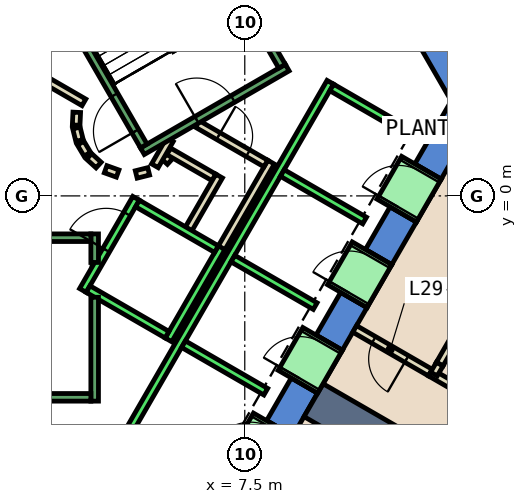
"""IFC4 building model, lengths in metres.
Left out: names, types, materials, properties, quantities, classifications, styles, units other than length and angle.
Written with IfcOpenShell. Run it as: python <this file> out.ifc"""

import sys

from ifc_helpers import new_model, si_unit, direction, frame, frame_2d, origin, place, context, subcontext, project, spatial, polyline, rectangle, outline, extrude, element, fill, save


model = new_model("IFC4")
c1 = context("Model", 3, precision=1e-05, world=origin(), true_north=direction((0.0, 1.0)))
c2 = subcontext(c1, "Body", "Model", "MODEL_VIEW")
j1 = project(units=[si_unit("LENGTHUNIT", "METRE"), si_unit("PLANEANGLEUNIT", "RADIAN")], contexts=[c1])
p1 = place(None, origin())
s1 = spatial("IfcSite", under=j1, at=p1, CompositionType="ELEMENT")
p2 = place(p1, origin())
s2 = spatial("IfcBuilding", under=s1, at=p2, CompositionType="ELEMENT")
p3 = place(p2, frame((0.0, 0.0, 132.8)))
s3 = spatial("IfcBuildingStorey", under=s2, at=p3, CompositionType="ELEMENT", Elevation=132.8)
p4 = place(p3, frame((0.0, 0.0, -0.6)))
e1 = element("IfcWall", 1, at=p4, inside=s3, PredefinedType="SHEAR", context=c2, shape_type="SweptSolid", body=[
    extrude(outline(polyline([(8.517, 11.747), (7.824, 11.347), (12.933, 2.5), (13.856, 2.5), (8.517, 11.747)])), origin(), (0.0, 0.0, 1.0), 5.4),
])
p5 = place(p3, frame((0.0, 0.0, -0.6)))
e2 = element("IfcWall", 2, at=p5, inside=s3, PredefinedType="SHEAR", context=c2, shape_type="SweptSolid", body=[
    extrude(outline(polyline([(9.417, -5.189), (8.724, -4.789), (8.075, -5.914), (8.767, -6.314), (9.417, -5.189)])), origin(), (0.0, 0.0, 1.0), 5.4),
])
p6 = place(p3, frame((0.0, 0.0, -0.6)))
e3 = element("IfcWall", 3, at=p6, inside=s3, PredefinedType="SHEAR", context=c2, shape_type="SweptSolid", body=[
    extrude(outline(polyline([(10.717, -2.937), (10.025, -2.537), (9.374, -3.663), (10.067, -4.063), (10.717, -2.937)])), origin(), (0.0, 0.0, 1.0), 5.4),
])
p7 = place(p3, frame((0.0, 0.0, -0.6)))
e4 = element("IfcWall", 4, at=p7, inside=s3, PredefinedType="SHEAR", context=c2, shape_type="SweptSolid", body=[
    extrude(outline(polyline([(12.017, -0.686), (11.324, -0.286), (10.675, -1.411), (11.367, -1.811), (12.017, -0.686)])), origin(), (0.0, 0.0, 1.0), 5.4),
])
p8 = place(p3, frame((0.0, 0.0, -0.6)))
e5 = element("IfcWall", 5, at=p8, inside=s3, PredefinedType="SHEAR", context=c2, shape_type="SweptSolid", body=[
    extrude(outline(polyline([(11.974, 0.84), (12.667, 0.44), (13.856, 2.5), (12.933, 2.5), (11.974, 0.84)])), origin(), (0.0, 0.0, 1.0), 5.4),
])
p9 = place(p3, frame((0.0, 0.0, 3.6)))
e6 = element("IfcWall", 6, at=p9, inside=s3, PredefinedType="SHEAR", context=c2, shape_type="SweptSolid", body=[
    extrude(outline(polyline([(8.767, -6.314), (8.075, -5.914), (7.424, -7.04), (8.117, -7.44), (8.767, -6.314)])), origin(), (0.0, 0.0, 1.0), 1.2),
])
p10 = place(p3, frame((0.0, 0.0, 3.6)))
e7 = element("IfcWall", 7, at=p10, inside=s3, PredefinedType="SHEAR", context=c2, shape_type="SweptSolid", body=[
    extrude(outline(polyline([(10.067, -4.063), (9.374, -3.663), (8.724, -4.789), (9.417, -5.189), (10.067, -4.063)])), origin(), (0.0, 0.0, 1.0), 1.2),
])
p11 = place(p3, frame((0.0, 0.0, 3.6)))
e8 = element("IfcWall", 8, at=p11, inside=s3, PredefinedType="SHEAR", context=c2, shape_type="SweptSolid", body=[
    extrude(outline(polyline([(11.367, -1.811), (10.675, -1.411), (10.025, -2.537), (10.717, -2.937), (11.367, -1.811)])), origin(), (0.0, 0.0, 1.0), 1.2),
])
p12 = place(p3, frame((0.0, 0.0, 3.6)))
e9 = element("IfcWall", 9, at=p12, inside=s3, PredefinedType="SHEAR", context=c2, shape_type="SweptSolid", body=[
    extrude(outline(polyline([(12.667, 0.44), (11.974, 0.84), (11.324, -0.286), (12.017, -0.686), (12.667, 0.44)])), origin(), (0.0, 0.0, 1.0), 1.2),
])
p13 = place(p3, frame((9.31, -5.375, 0.0), z_axis=(0.0, 0.0, 1.0), x_axis=(0.86602173752, -0.500006350103, 0.0)))
e10 = element("IfcWall", 10, at=p13, inside=s3, PredefinedType="SHEAR", context=c2, shape_type="SweptSolid", body=[
    extrude(rectangle(XDim=31.463, YDim=1.0, at=frame_2d((15.732, 0.0))), origin(), (0.0, 0.0, 1.0), 4.8),
])
p14 = place(p3, frame((5.39, 0.898, 0.0), z_axis=(0.0, 0.0, 1.0), x_axis=(0.673828488714, 0.738887791073, 0.0)))
e11 = element("IfcWall", 11, at=p14, inside=s3, PredefinedType="PARTITIONING", context=c2, shape_type="SweptSolid", body=[
    extrude(rectangle(XDim=0.263, YDim=0.2, at=frame_2d((0.131, 0.0))), origin(), (0.0, 0.0, 1.0), 4.8),
])
p15 = place(p3, frame((5.499, 1.172, 0.0), z_axis=(0.0, 0.0, 1.0), x_axis=(0.866333505267, -0.499465972466, 0.0)))
e12 = element("IfcWall", 12, at=p15, inside=s3, PredefinedType="PARTITIONING", context=c2, shape_type="SweptSolid", body=[
    extrude(rectangle(XDim=1.374, YDim=0.2, at=frame_2d((0.687, 0.0))), origin(), (0.0, 0.0, 1.0), 4.8),
])
p16 = place(p3, frame((6.826, 0.522, 0.0), z_axis=(0.0, 0.0, 1.0), x_axis=(-0.500016722714, -0.866015748706, 0.0)))
e13 = element("IfcWall", 13, at=p16, inside=s3, PredefinedType="PARTITIONING", context=c2, shape_type="SweptSolid", body=[
    extrude(rectangle(XDim=1.7, YDim=0.2, at=frame_2d((0.85, 0.0))), origin(), (0.0, 0.0, 1.0), 4.8),
])
p17 = place(p3, frame((8.192, 0.888, 0.0), z_axis=(0.0, 0.0, 1.0), x_axis=(-0.499940625693, -0.866059680843, 0.0)))
e14 = element("IfcWall", 14, at=p17, inside=s3, PredefinedType="PARTITIONING", context=c2, shape_type="SweptSolid", body=[
    extrude(rectangle(XDim=2.68, YDim=0.2, at=frame_2d((1.34, 0.0))), origin(), (0.0, 0.0, 1.0), 4.8),
])
p18 = place(p3, frame((5.135, 0.793, 0.0), z_axis=(0.0, 0.0, 1.0), x_axis=(0.499526442893, 0.866298639529, 0.0)))
e15 = element("IfcWall", 15, at=p18, inside=s3, PredefinedType="PARTITIONING", context=c2, shape_type="SweptSolid", body=[
    extrude(rectangle(XDim=0.791, YDim=0.2, at=frame_2d((0.396, 0.0))), origin(), (0.0, 0.0, 1.0), 4.8),
])
p19 = place(p3, frame((6.25, 1.894, 0.0), z_axis=(0.0, 0.0, 1.0), x_axis=(0.866043184279, -0.499969202016, 0.0)))
e16 = element("IfcWall", 16, at=p19, inside=s3, PredefinedType="PARTITIONING", context=c2, shape_type="SweptSolid", body=[
    extrude(rectangle(XDim=2.084, YDim=0.2, at=frame_2d((1.042, 0.0))), origin(), (0.0, 0.0, 1.0), 4.8),
])
p20 = place(p19, frame((0.642, 0.0, 0.0)))
e17 = element("IfcOpeningElement", 17, at=p20, cuts=e16, PredefinedType="OPENING", context=c2, shape_type="SweptSolid", body=[
    extrude(rectangle(XDim=0.9, YDim=2.1, at=frame_2d((0.45, 1.05))), frame((0.0, 0.11, 0.0), z_axis=(0.0, -1.0, 0.0), x_axis=(1.0, 0.0, 0.0)), (0.0, 0.0, 1.0), 0.22),
])
p21 = place(p3, frame((3.079, 2.199, 0.0), z_axis=(0.0, 0.0, 1.0), x_axis=(-0.047771483479, -0.998858290933, 0.0)))
e18 = element("IfcWall", 18, at=p21, inside=s3, PredefinedType="PARTITIONING", context=c2, shape_type="SweptSolid", body=[
    extrude(rectangle(XDim=0.337, YDim=0.2, at=frame_2d((0.169, 0.0))), origin(), (0.0, 0.0, 1.0), 4.8),
])
p22 = place(p3, frame((3.07, 1.786, 0.0), z_axis=(0.0, 0.0, 1.0), x_axis=(0.242705583207, -0.970099994784, 0.0)))
e19 = element("IfcWall", 19, at=p22, inside=s3, PredefinedType="PARTITIONING", context=c2, shape_type="SweptSolid", body=[
    extrude(rectangle(XDim=0.338, YDim=0.2, at=frame_2d((0.169, 0.0))), origin(), (0.0, 0.0, 1.0), 4.8),
])
for number, where, z_axis, x_axis in (
    (20, (3.182, 1.388, 0.0), (0.0, 0.0, 1.0), (0.512, -0.859, 0.0)),
    (21, (3.404, 1.039, 0.0), (0.0, 0.0, 1.0), (0.74, -0.672, 0.0)),
):
    element("IfcWall", number, at=place(p3, frame(where, z_axis=z_axis, x_axis=x_axis)), inside=s3, PredefinedType="PARTITIONING", context=c2, shape_type="SweptSolid", body=[
        extrude(rectangle(XDim=0.338, YDim=0.2, at=frame_2d((0.169, 0.0))), origin(), (0.0, 0.0, 1.0), 4.8),
    ])
p23 = place(p3, frame((3.838, 0.702, 0.0), z_axis=(0.0, 0.0, 1.0), x_axis=(0.941035081519, -0.338308993895, 0.0)))
e22 = element("IfcWall", 22, at=p23, inside=s3, PredefinedType="PARTITIONING", context=c2, shape_type="SweptSolid", body=[
    extrude(rectangle(XDim=0.337, YDim=0.2, at=frame_2d((0.168, 0.0))), origin(), (0.0, 0.0, 1.0), 4.8),
])
p24 = place(p3, frame((4.644, 0.564, 0.0), z_axis=(0.0, 0.0, 1.0), x_axis=(0.969929076366, 0.243387729394, 0.0)))
e23 = element("IfcWall", 23, at=p24, inside=s3, PredefinedType="PARTITIONING", context=c2, shape_type="SweptSolid", body=[
    extrude(rectangle(XDim=0.337, YDim=0.2, at=frame_2d((0.168, 0.0))), origin(), (0.0, 0.0, 1.0), 4.8),
])
p25 = place(p3, frame((2.012, 3.186, 0.0), z_axis=(0.0, 0.0, 1.0), x_axis=(0.865891012941, -0.500232699559, 0.0)))
e24 = element("IfcWall", 24, at=p25, inside=s3, PredefinedType="PARTITIONING", context=c2, shape_type="SweptSolid", body=[
    extrude(rectangle(XDim=1.449, YDim=0.2, at=frame_2d((0.725, 0.0))), origin(), (0.0, 0.0, 1.0), 4.8),
])
p26 = place(p3, frame((12.384, -4.65, 0.0), z_axis=(0.0, 0.0, 1.0), x_axis=(-0.866053019151, 0.499952165731, 0.0)))
e25 = element("IfcWall", 25, at=p26, inside=s3, PredefinedType="PARTITIONING", context=c2, shape_type="SweptSolid", body=[
    extrude(rectangle(XDim=2.3, YDim=0.2, at=frame_2d((1.15, 0.0))), origin(), (0.0, 0.0, 1.0), 4.8),
])
p27 = place(p26, frame((0.721, 0.0, 0.0)))
e26 = element("IfcOpeningElement", 26, at=p27, cuts=e25, PredefinedType="OPENING", context=c2, shape_type="SweptSolid", body=[
    extrude(rectangle(XDim=1.0, YDim=2.1, at=frame_2d((0.5, 1.05))), frame((0.0, 0.11, 0.0), z_axis=(0.0, -1.0, 0.0), x_axis=(1.0, 0.0, 0.0)), (0.0, 0.0, 1.0), 0.22),
])
p28 = place(p3, frame((12.384, -4.65, 0.0), z_axis=(0.0, 0.0, 1.0), x_axis=(0.866033509011, -0.499985961072, 0.0)))
e27 = element("IfcWall", 27, at=p28, inside=s3, PredefinedType="PARTITIONING", context=c2, shape_type="SweptSolid", body=[
    extrude(rectangle(XDim=29.487, YDim=0.2, at=frame_2d((14.744, 0.0))), origin(), (0.0, 0.0, 1.0), 4.8),
])
p29 = place(p3, frame((11.938, 10.622, 0.0), z_axis=(0.0, 0.0, 1.0), x_axis=(0.499964736285, -0.866045762343, 0.0)))
e28 = element("IfcWall", 28, at=p29, inside=s3, PredefinedType="PARTITIONING", context=c2, shape_type="SweptSolid", body=[
    extrude(rectangle(XDim=9.479, YDim=0.2, at=frame_2d((4.739, 0.0))), origin(), (0.0, 0.0, 1.0), 4.8),
])
p30 = place(p29, frame((8.161, 0.0, 0.0)))
e29 = element("IfcOpeningElement", 29, at=p30, cuts=e28, PredefinedType="OPENING", context=c2, shape_type="SweptSolid", body=[
    extrude(rectangle(XDim=1.0, YDim=2.1, at=frame_2d((0.5, 1.05))), frame((0.0, 0.11, 0.0), z_axis=(0.0, -1.0, 0.0), x_axis=(1.0, 0.0, 0.0)), (0.0, 0.0, 1.0), 0.22),
])
p31 = place(p3, frame((13.085, -3.637, 0.0), z_axis=(0.0, 0.0, 1.0), x_axis=(-0.500402557727, -0.865792862191, 0.0)))
e30 = element("IfcWall", 30, at=p31, inside=s3, PredefinedType="PARTITIONING", context=c2, shape_type="SweptSolid", body=[
    extrude(rectangle(XDim=0.911, YDim=0.2, at=frame_2d((0.456, 0.0))), origin(), (0.0, 0.0, 1.0), 2.1),
])
p32 = place(p3, frame((12.629, -4.426, 0.0), z_axis=(0.0, 0.0, 1.0), x_axis=(-0.500493465029, -0.865740314103, 0.0)))
e31 = element("IfcWall", 31, at=p32, inside=s3, PredefinedType="PARTITIONING", context=c2, shape_type="SweptSolid", body=[
    extrude(rectangle(XDim=0.302, YDim=0.2, at=frame_2d((0.151, 0.0))), origin(), (0.0, 0.0, 1.0), 4.8),
])
p33 = place(p3, frame((3.24, -2.488, 0.0), z_axis=(0.0, 0.0, 1.0), x_axis=(0.49994636267, 0.866056369097, 0.0)))
e32 = element("IfcWall", 32, at=p33, inside=s3, PredefinedType="STANDARD", context=c2, shape_type="SweptSolid", body=[
    extrude(rectangle(XDim=2.8, YDim=0.2, at=frame_2d((1.4, 0.0))), origin(), (0.0, 0.0, 1.0), 4.8),
])
p34 = place(p33, frame((1.225, 0.0, 0.0)))
e33 = element("IfcOpeningElement", 33, at=p34, cuts=e32, PredefinedType="OPENING", context=c2, shape_type="SweptSolid", body=[
    extrude(rectangle(XDim=1.1, YDim=2.1, at=frame_2d((0.55, 1.05))), frame((0.0, 0.11, 0.0), z_axis=(0.0, -1.0, 0.0), x_axis=(1.0, 0.0, 0.0)), (0.0, 0.0, 1.0), 0.22),
])
p35 = place(p3, frame((5.492, -3.788, 0.0), z_axis=(0.0, 0.0, 1.0), x_axis=(0.500011755427, 0.866018616679, 0.0)))
e34 = element("IfcWall", 34, at=p35, inside=s3, PredefinedType="STANDARD", context=c2, shape_type="SweptSolid", body=[
    extrude(rectangle(XDim=2.8, YDim=0.2, at=frame_2d((1.4, 0.0))), origin(), (0.0, 0.0, 1.0), 4.8),
])
p36 = place(p3, frame((3.377, -2.452, 0.0), z_axis=(0.0, 0.0, 1.0), x_axis=(0.865955154139, -0.50012165622, 0.0)))
e35 = element("IfcWall", 35, at=p36, inside=s3, PredefinedType="STANDARD", context=c2, shape_type="SweptSolid", body=[
    extrude(rectangle(XDim=2.4, YDim=0.2, at=frame_2d((1.2, 0.0))), origin(), (0.0, 0.0, 1.0), 4.8),
])
p37 = place(p3, frame((4.677, -0.2, 0.0), z_axis=(0.0, 0.0, 1.0), x_axis=(0.865973769406, -0.500089422704, 0.0)))
e36 = element("IfcWall", 36, at=p37, inside=s3, PredefinedType="STANDARD", context=c2, shape_type="SweptSolid", body=[
    extrude(rectangle(XDim=2.399, YDim=0.2, at=frame_2d((1.2, 0.0))), origin(), (0.0, 0.0, 1.0), 4.8),
])
p38 = place(p3, frame((4.451, -6.19, 0.0), z_axis=(0.0, 0.0, 1.0), x_axis=(0.50000090737, 0.866024879913, 0.0)))
e37 = element("IfcWall", 37, at=p38, inside=s3, PredefinedType="STANDARD", context=c2, shape_type="SweptSolid", body=[
    extrude(rectangle(XDim=10.6, YDim=0.2, at=frame_2d((5.3, 0.0))), origin(), (0.0, 0.0, 1.0), 4.8),
])
for number, where, z_axis, x_axis in (
    (38, (5.888, -3.902, 0.0), (0.0, 0.0, 1.0), (0.866, -0.5, 0.0)),
    (39, (7.188, -1.65, 0.0), (0.0, 0.0, 1.0), (0.866, -0.5, 0.0)),
    (40, (8.488, 0.602, 0.0), (0.0, 0.0, 1.0), (0.866, -0.5, 0.0)),
):
    element("IfcWall", number, at=place(p3, frame(where, z_axis=z_axis, x_axis=x_axis)), inside=s3, PredefinedType="STANDARD", context=c2, shape_type="SweptSolid", body=[
        extrude(rectangle(XDim=2.5, YDim=0.2, at=frame_2d((1.25, 0.0))), origin(), (0.0, 0.0, 1.0), 4.8),
    ])
p39 = place(p3, frame((9.788, 2.853, 0.0), z_axis=(0.0, 0.0, 1.0), x_axis=(0.865998541277, -0.500046524342, 0.0)))
e41 = element("IfcWall", 41, at=p39, inside=s3, PredefinedType="STANDARD", context=c2, shape_type="SweptSolid", body=[
    extrude(rectangle(XDim=2.5, YDim=0.2, at=frame_2d((1.25, 0.0))), origin(), (0.0, 0.0, 1.0), 4.8),
])
p40 = place(p3, frame((7.598, -7.14, 0.0), z_axis=(0.0, 0.0, 1.0), x_axis=(0.500362116554, 0.865816234728, 0.0)))
e42 = element("IfcWall", 42, at=p40, inside=s3, PredefinedType="STANDARD", context=c2, shape_type="SweptSolid", body=[
    extrude(rectangle(XDim=1.299, YDim=1.2, at=frame_2d((0.65, 0.0))), origin(), (0.0, 0.0, 1.0), 2.4),
])
p41 = place(p40, frame((0.1, 0.0, 0.0)))
e43 = element("IfcOpeningElement", 43, at=p41, cuts=e42, PredefinedType="OPENING", context=c2, shape_type="SweptSolid", body=[
    extrude(rectangle(XDim=1.1, YDim=2.3, at=frame_2d((0.55, 1.15))), frame((0.0, 0.61, 0.0), z_axis=(0.0, -1.0, 0.0), x_axis=(1.0, 0.0, 0.0)), (0.0, 0.0, 1.0), 1.22),
])
p42 = place(p3, frame((8.898, -4.889, 0.0), z_axis=(0.0, 0.0, 1.0), x_axis=(0.500036693733, 0.866004217611, 0.0)))
e44 = element("IfcWall", 44, at=p42, inside=s3, PredefinedType="STANDARD", context=c2, shape_type="SweptSolid", body=[
    extrude(rectangle(XDim=1.3, YDim=1.2, at=frame_2d((0.65, 0.0))), origin(), (0.0, 0.0, 1.0), 2.4),
])
p43 = place(p42, frame((0.1, 0.0, 0.0)))
e45 = element("IfcOpeningElement", 45, at=p43, cuts=e44, PredefinedType="OPENING", context=c2, shape_type="SweptSolid", body=[
    extrude(rectangle(XDim=1.1, YDim=2.3, at=frame_2d((0.55, 1.15))), frame((0.0, 0.61, 0.0), z_axis=(0.0, -1.0, 0.0), x_axis=(1.0, 0.0, 0.0)), (0.0, 0.0, 1.0), 1.22),
])
p44 = place(p3, frame((10.198, -2.637, 0.0), z_axis=(0.0, 0.0, 1.0), x_axis=(0.49989585183, 0.866085525409, 0.0)))
e46 = element("IfcWall", 46, at=p44, inside=s3, PredefinedType="STANDARD", context=c2, shape_type="SweptSolid", body=[
    extrude(rectangle(XDim=1.3, YDim=1.2, at=frame_2d((0.65, 0.0))), origin(), (0.0, 0.0, 1.0), 2.4),
])
p45 = place(p44, frame((0.1, 0.0, 0.0)))
e47 = element("IfcOpeningElement", 47, at=p45, cuts=e46, PredefinedType="OPENING", context=c2, shape_type="SweptSolid", body=[
    extrude(rectangle(XDim=1.1, YDim=2.3, at=frame_2d((0.55, 1.15))), frame((0.0, 0.61, 0.0), z_axis=(0.0, -1.0, 0.0), x_axis=(1.0, 0.0, 0.0)), (0.0, 0.0, 1.0), 1.22),
])
p46 = place(p3, frame((11.498, -0.385, 0.0), z_axis=(0.0, 0.0, 1.0), x_axis=(0.500221244143, 0.865897630733, 0.0)))
e48 = element("IfcWall", 48, at=p46, inside=s3, PredefinedType="STANDARD", context=c2, shape_type="SweptSolid", body=[
    extrude(rectangle(XDim=1.299, YDim=1.2, at=frame_2d((0.65, 0.0))), origin(), (0.0, 0.0, 1.0), 2.4),
])
p47 = place(p46, frame((0.1, 0.0, 0.0)))
e49 = element("IfcOpeningElement", 49, at=p47, cuts=e48, PredefinedType="OPENING", context=c2, shape_type="SweptSolid", body=[
    extrude(rectangle(XDim=1.1, YDim=2.3, at=frame_2d((0.55, 1.15))), frame((0.0, 0.61, 0.0), z_axis=(0.0, -1.0, 0.0), x_axis=(1.0, 0.0, 0.0)), (0.0, 0.0, 1.0), 1.22),
])
p48 = place(p3, frame((3.55, -2.667, 0.0), z_axis=(0.0, 0.0, 1.0), x_axis=(0.0, -1.0, 0.0)))
e50 = element("IfcWall", 50, at=p48, inside=s3, PredefinedType="STANDARD", context=c2, shape_type="SweptSolid", body=[
    extrude(rectangle(XDim=2.733, YDim=0.2, at=frame_2d((1.366, 0.0))), origin(), (0.0, 0.0, 1.0), 4.8),
])
p49 = place(p3, frame((3.55, -1.0, 0.0), z_axis=(0.0, 0.0, 1.0), x_axis=(0.0, -1.0, 0.0)))
e51 = element("IfcWall", 51, at=p49, inside=s3, PredefinedType="STANDARD", context=c2, shape_type="SweptSolid", body=[
    extrude(rectangle(XDim=0.751, YDim=0.2, at=frame_2d((0.375, 0.0))), origin(), (0.0, 0.0, 1.0), 4.8),
])
p50 = place(p3, frame((-3.45, -1.1, 0.0), z_axis=(0.0, 0.0, 1.0), x_axis=(1.0, 0.0, 0.0)))
e52 = element("IfcWall", 52, at=p50, inside=s3, PredefinedType="STANDARD", context=c2, shape_type="SweptSolid", body=[
    extrude(rectangle(XDim=6.9, YDim=0.2, at=frame_2d((3.45, 0.0))), origin(), (0.0, 0.0, 1.0), 4.8),
])
p51 = place(p50, frame((0.45, 0.0, 0.0)))
e53 = element("IfcOpeningElement", 53, at=p51, cuts=e52, PredefinedType="OPENING", context=c2, shape_type="SweptSolid", body=[
    extrude(rectangle(XDim=1.1, YDim=2.2, at=frame_2d((0.55, 1.1))), frame((0.0, 0.11, 0.0), z_axis=(0.0, -1.0, 0.0), x_axis=(1.0, 0.0, 0.0)), (0.0, 0.0, 1.0), 0.22),
])
p52 = place(p3, frame((-3.45, -5.3, 0.0), z_axis=(0.0, 0.0, 1.0), x_axis=(1.0, 0.0, 0.0)))
e54 = element("IfcWall", 54, at=p52, inside=s3, PredefinedType="STANDARD", context=c2, shape_type="SweptSolid", body=[
    extrude(rectangle(XDim=6.9, YDim=0.2, at=frame_2d((3.45, 0.0))), origin(), (0.0, 0.0, 1.0), 4.8),
])
p53 = place(p3, frame((4.806, 1.176, 0.0), z_axis=(0.0, 0.0, 1.0), x_axis=(0.866059941101, 0.499940174841, 0.0)))
e55 = element("IfcWall", 55, at=p53, inside=s3, PredefinedType="STANDARD", context=c2, shape_type="SweptSolid", body=[
    extrude(rectangle(XDim=4.4, YDim=0.2, at=frame_2d((2.2, 0.0))), origin(), (0.0, 0.0, 1.0), 4.8),
])
p54 = place(p53, frame((1.65, 0.0, 0.0)))
e56 = element("IfcOpeningElement", 56, at=p54, cuts=e55, PredefinedType="OPENING", context=c2, shape_type="SweptSolid", body=[
    extrude(rectangle(XDim=1.1, YDim=2.2, at=frame_2d((0.55, 1.1))), frame((0.0, 0.11, 0.0), z_axis=(0.0, -1.0, 0.0), x_axis=(1.0, 0.0, 0.0)), (0.0, 0.0, 1.0), 0.22),
])
p55 = place(p3, frame((4.843, 1.312, 0.0), z_axis=(0.0, 0.0, 1.0), x_axis=(-0.499963383562, 0.866046543262, 0.0)))
e57 = element("IfcWall", 57, at=p55, inside=s3, PredefinedType="STANDARD", context=c2, shape_type="SweptSolid", body=[
    extrude(rectangle(XDim=6.9, YDim=0.2, at=frame_2d((3.45, 0.0))), origin(), (0.0, 0.0, 1.0), 4.8),
])
p56 = place(p55, frame((0.45, 0.0, 0.0)))
e58 = element("IfcOpeningElement", 58, at=p56, cuts=e57, PredefinedType="OPENING", context=c2, shape_type="SweptSolid", body=[
    extrude(rectangle(XDim=1.1, YDim=2.2, at=frame_2d((0.55, 1.1))), frame((0.0, 0.11, 0.0), z_axis=(0.0, -1.0, 0.0), x_axis=(1.0, 0.0, 0.0)), (0.0, 0.0, 1.0), 0.22),
])
p57 = place(p3, frame((8.48, 3.412, 0.0), z_axis=(0.0, 0.0, 1.0), x_axis=(-0.499978703459, 0.866037698999, 0.0)))
e59 = element("IfcWall", 59, at=p57, inside=s3, PredefinedType="STANDARD", context=c2, shape_type="SweptSolid", body=[
    extrude(rectangle(XDim=6.9, YDim=0.2, at=frame_2d((3.45, 0.0))), origin(), (0.0, 0.0, 1.0), 4.8),
])
p58 = place(p27, origin())
e60 = element("IfcDoor", 60, at=p58, inside=s3, OperationType="SINGLE_SWING_LEFT", PredefinedType="DOOR", context=c2, shape_type="SweptSolid", body=[
    extrude(rectangle(XDim=1.0, YDim=2.1, at=frame_2d((0.5, 1.05))), frame((0.0, 0.025, 0.0), z_axis=(0.0, -1.0, 0.0), x_axis=(1.0, 0.0, 0.0)), (0.0, 0.0, 1.0), 0.05),
])
fill(e26, e60)
p59 = place(p20, origin())
e61 = element("IfcDoor", 61, at=p59, inside=s3, OperationType="SINGLE_SWING_LEFT", PredefinedType="DOOR", context=c2, shape_type="SweptSolid", body=[
    extrude(rectangle(XDim=0.9, YDim=2.1, at=frame_2d((0.45, 1.05))), frame((0.0, 0.025, 0.0), z_axis=(0.0, -1.0, 0.0), x_axis=(1.0, 0.0, 0.0)), (0.0, 0.0, 1.0), 0.05),
])
fill(e17, e61)
p60 = place(p43, origin())
e62 = element("IfcDoor", 62, at=p60, inside=s3, OperationType="SLIDING_TO_LEFT", PredefinedType="DOOR", context=c2, shape_type="SweptSolid", body=[
    extrude(rectangle(XDim=1.1, YDim=2.3, at=frame_2d((0.55, 1.15))), frame((0.0, 0.025, 0.0), z_axis=(0.0, -1.0, 0.0), x_axis=(1.0, 0.0, 0.0)), (0.0, 0.0, 1.0), 0.05),
])
fill(e45, e62)
p61 = place(p45, origin())
e63 = element("IfcDoor", 63, at=p61, inside=s3, OperationType="SLIDING_TO_LEFT", PredefinedType="DOOR", context=c2, shape_type="SweptSolid", body=[
    extrude(rectangle(XDim=1.1, YDim=2.3, at=frame_2d((0.55, 1.15))), frame((0.0, 0.025, 0.0), z_axis=(0.0, -1.0, 0.0), x_axis=(1.0, 0.0, 0.0)), (0.0, 0.0, 1.0), 0.05),
])
fill(e47, e63)
p62 = place(p47, origin())
e64 = element("IfcDoor", 64, at=p62, inside=s3, OperationType="SLIDING_TO_LEFT", PredefinedType="DOOR", context=c2, shape_type="SweptSolid", body=[
    extrude(rectangle(XDim=1.1, YDim=2.3, at=frame_2d((0.55, 1.15))), frame((0.0, 0.025, 0.0), z_axis=(0.0, -1.0, 0.0), x_axis=(1.0, 0.0, 0.0)), (0.0, 0.0, 1.0), 0.05),
])
fill(e49, e64)
p63 = place(p34, origin())
e65 = element("IfcDoor", 65, at=p63, inside=s3, OperationType="SLIDING_TO_LEFT", PredefinedType="DOOR", context=c2, shape_type="SweptSolid", body=[
    extrude(rectangle(XDim=1.1, YDim=2.1, at=frame_2d((0.55, 1.05))), frame((0.0, 0.025, 0.0), z_axis=(0.0, -1.0, 0.0), x_axis=(1.0, 0.0, 0.0)), (0.0, 0.0, 1.0), 0.05),
])
fill(e33, e65)
p64 = place(p56, origin())
e66 = element("IfcDoor", 66, at=p64, inside=s3, OperationType="SINGLE_SWING_LEFT", PredefinedType="DOOR", context=c2, shape_type="SweptSolid", body=[
    extrude(rectangle(XDim=1.1, YDim=2.2, at=frame_2d((0.55, 1.1))), frame((0.0, 0.025, 0.0), z_axis=(0.0, -1.0, 0.0), x_axis=(1.0, 0.0, 0.0)), (0.0, 0.0, 1.0), 0.05),
])
fill(e58, e66)
p65 = place(p54, origin())
e67 = element("IfcDoor", 67, at=p65, inside=s3, OperationType="SINGLE_SWING_LEFT", PredefinedType="DOOR", context=c2, shape_type="SweptSolid", body=[
    extrude(rectangle(XDim=1.1, YDim=2.2, at=frame_2d((0.55, 1.1))), frame((0.0, 0.025, 0.0), z_axis=(0.0, -1.0, 0.0), x_axis=(1.0, 0.0, 0.0)), (0.0, 0.0, 1.0), 0.05),
])
fill(e56, e67)
save(model, sys.argv[1])
